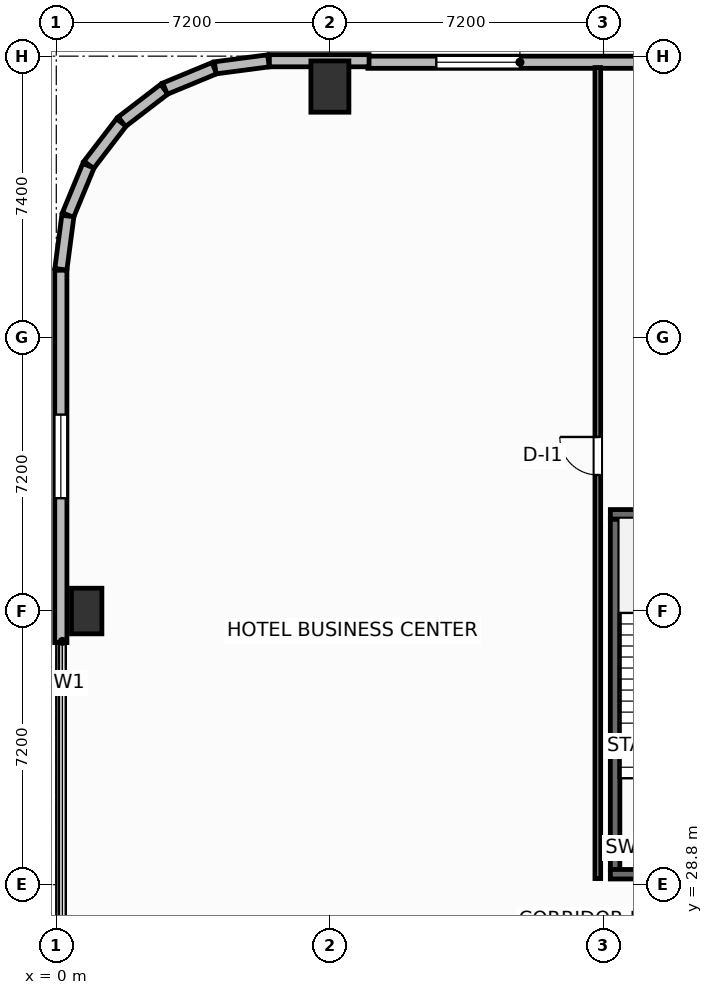
"""IFC4 building model, lengths in metres.
Left out: names, types, materials, properties, quantities, classifications, styles, units other than length and angle.
Written with IfcOpenShell. Run it as: python <this file> out.ifc"""

import sys

from ifc_helpers import new_model, si_unit, direction, frame, frame_2d, origin, origin_2d, place, context, subcontext, project, spatial, rectangle, extrude, element, fill, save


model = new_model("IFC4")
c1 = context("Model", 3, precision=1e-05, world=origin(), true_north=direction((0.0, 1.0)))
c2 = subcontext(c1, "Body", "Model", "MODEL_VIEW")
j1 = project(units=[si_unit("LENGTHUNIT", "METRE"), si_unit("PLANEANGLEUNIT", "RADIAN")], contexts=[c1])
p1 = place(None, origin())
s1 = spatial("IfcSite", under=j1, at=p1, CompositionType="ELEMENT")
p2 = place(p1, origin())
s2 = spatial("IfcBuilding", under=s1, at=p2, CompositionType="ELEMENT")
p3 = place(p2, frame((0.0, 0.0, 16.2)))
s3 = spatial("IfcBuildingStorey", under=s2, at=p3, CompositionType="ELEMENT", Elevation=16.2)
p4 = place(p3, frame((14.705, 29.2, 0.0), z_axis=(0.0, 0.0, 1.0), x_axis=(0.0, 1.0, 0.0)))
e1 = element("IfcWall", 1, at=p4, inside=s3, PredefinedType="SHEAR", context=c2, shape_type="SweptSolid", body=[
    extrude(rectangle(XDim=9.22, YDim=0.25, at=frame_2d((4.61, 0.0))), origin(), (0.0, 0.0, 1.0), 5.08),
])
for number, where, z_axis, x_axis in (
    (2, (14.58, 38.545, 0.0), (0.0, 0.0, 1.0), (1.0, 0.0, 0.0)),
    (3, (14.58, 29.075, 0.0), (0.0, 0.0, 1.0), (1.0, 0.0, 0.0)),
):
    element("IfcWall", number, at=place(p3, frame(where, z_axis=z_axis, x_axis=x_axis)), inside=s3, PredefinedType="SHEAR", context=c2, shape_type="SweptSolid", body=[
        extrude(rectangle(XDim=3.89, YDim=0.25, at=frame_2d((1.945, 0.0))), origin(), (0.0, 0.0, 1.0), 5.08),
    ])
p5 = place(p3, frame((7.2, 49.8, 0.0), z_axis=(0.0, 0.0, 1.0), x_axis=(1.0, 0.0, 0.0)))
e4 = element("IfcColumn", 4, at=p5, inside=s3, PredefinedType="COLUMN", context=c2, shape_type="SweptSolid", body=[
    extrude(rectangle(XDim=1.0, YDim=1.35, at=origin_2d()), origin(), (0.0, 0.0, 1.0), 5.4),
])
p6 = place(p3, frame((0.8, 36.0, 0.0), z_axis=(0.0, 0.0, 1.0), x_axis=(1.0, 0.0, 0.0)))
e5 = element("IfcColumn", 5, at=p6, inside=s3, PredefinedType="PILASTER", context=c2, shape_type="SweptSolid", body=[
    extrude(rectangle(XDim=0.8, YDim=1.2, at=origin_2d()), origin(), (0.0, 0.0, 1.0), 5.4),
])
p7 = place(p3, frame((8.2, 50.44, 0.0), z_axis=(0.0, 0.0, 1.0), x_axis=(1.0, 0.0, 0.0)))
e6 = element("IfcWall", 6, at=p7, inside=s3, PredefinedType="SOLIDWALL", context=c2, shape_type="SweptSolid", body=[
    extrude(rectangle(XDim=15.2, YDim=0.32, at=frame_2d((7.6, 0.0))), origin(), (0.0, 0.0, 1.0), 4.03),
])
p8 = place(p7, frame((1.8, 0.0, 0.8)))
e7 = element("IfcOpeningElement", 7, at=p8, cuts=e6, PredefinedType="OPENING", context=c2, shape_type="SweptSolid", body=[
    extrude(rectangle(XDim=2.2, YDim=1.85, at=frame_2d((1.1, 0.925))), frame((0.0, 0.17, 0.0), z_axis=(0.0, -1.0, 0.0), x_axis=(1.0, 0.0, 0.0)), (0.0, 0.0, 1.0), 0.34),
])
p9 = place(p7, frame((11.2, 0.0, 0.8)))
e8 = element("IfcOpeningElement", 8, at=p9, cuts=e6, PredefinedType="OPENING", context=c2, shape_type="SweptSolid", body=[
    extrude(rectangle(XDim=2.2, YDim=1.85, at=frame_2d((1.1, 0.925))), frame((0.0, 0.17, 0.0), z_axis=(0.0, -1.0, 0.0), x_axis=(1.0, 0.0, 0.0)), (0.0, 0.0, 1.0), 0.34),
])
p10 = place(p3, frame((8.23, 50.48, 0.0), z_axis=(0.0, 0.0, 1.0), x_axis=(-1.0, 0.0, 0.0)))
e9 = element("IfcWall", 9, at=p10, inside=s3, PredefinedType="SOLIDWALL", context=c2, shape_type="SweptSolid", body=[
    extrude(rectangle(XDim=2.622, YDim=0.32, at=frame_2d((1.311, 0.0))), origin(), (0.0, 0.0, 1.0), 4.03),
])
p11 = place(p3, frame((5.583, 50.477, 0.0), z_axis=(0.0, 0.0, 1.0), x_axis=(-0.991434880626, -0.130601981138, 0.0)))
e10 = element("IfcWall", 10, at=p11, inside=s3, PredefinedType="SOLIDWALL", context=c2, shape_type="SweptSolid", body=[
    extrude(rectangle(XDim=1.413, YDim=0.32, at=frame_2d((0.707, 0.0))), origin(), (0.0, 0.0, 1.0), 4.03),
])
p12 = place(p3, frame((4.159, 50.283, 0.0), z_axis=(0.0, 0.0, 1.0), x_axis=(-0.923841042178, -0.382776343035, 0.0)))
e11 = element("IfcWall", 11, at=p12, inside=s3, PredefinedType="SOLIDWALL", context=c2, shape_type="SweptSolid", body=[
    extrude(rectangle(XDim=1.405, YDim=0.32, at=frame_2d((0.703, 0.0))), origin(), (0.0, 0.0, 1.0), 4.03),
])
p13 = place(p3, frame((2.841, 49.73, 0.0), z_axis=(0.0, 0.0, 1.0), x_axis=(-0.79338541907, -0.60871962085, 0.0)))
e12 = element("IfcWall", 12, at=p13, inside=s3, PredefinedType="SOLIDWALL", context=c2, shape_type="SweptSolid", body=[
    extrude(rectangle(XDim=1.405, YDim=0.32, at=frame_2d((0.703, 0.0))), origin(), (0.0, 0.0, 1.0), 4.03),
])
p14 = place(p3, frame((1.711, 48.854, 0.0), z_axis=(0.0, 0.0, 1.0), x_axis=(-0.608828954222, -0.793301521807, 0.0)))
e13 = element("IfcWall", 13, at=p14, inside=s3, PredefinedType="SOLIDWALL", context=c2, shape_type="SweptSolid", body=[
    extrude(rectangle(XDim=1.406, YDim=0.32, at=frame_2d((0.703, 0.0))), origin(), (0.0, 0.0, 1.0), 4.03),
])
p15 = place(p3, frame((0.846, 47.716, 0.0), z_axis=(0.0, 0.0, 1.0), x_axis=(-0.382924622758, -0.923779591291, 0.0)))
e14 = element("IfcWall", 14, at=p15, inside=s3, PredefinedType="SOLIDWALL", context=c2, shape_type="SweptSolid", body=[
    extrude(rectangle(XDim=1.405, YDim=0.32, at=frame_2d((0.703, 0.0))), origin(), (0.0, 0.0, 1.0), 4.03),
])
p16 = place(p3, frame((0.304, 46.393, 0.0), z_axis=(0.0, 0.0, 1.0), x_axis=(-0.130432168094, -0.991457235349, 0.0)))
e15 = element("IfcWall", 15, at=p16, inside=s3, PredefinedType="SOLIDWALL", context=c2, shape_type="SweptSolid", body=[
    extrude(rectangle(XDim=1.413, YDim=0.32, at=frame_2d((0.707, 0.0))), origin(), (0.0, 0.0, 1.0), 4.03),
])
p17 = place(p3, frame((0.12, 44.967, 0.0), z_axis=(0.0, 0.0, 1.0), x_axis=(0.0, -1.0, 0.0)))
e16 = element("IfcWall", 16, at=p17, inside=s3, PredefinedType="SOLIDWALL", context=c2, shape_type="SweptSolid", body=[
    extrude(rectangle(XDim=9.797, YDim=0.32, at=frame_2d((4.898, 0.0))), origin(), (0.0, 0.0, 1.0), 4.03),
])
p18 = place(p17, frame((3.799, 0.0, 0.8)))
e17 = element("IfcOpeningElement", 17, at=p18, cuts=e16, PredefinedType="OPENING", context=c2, shape_type="SweptSolid", body=[
    extrude(rectangle(XDim=2.2, YDim=2.0, at=frame_2d((1.1, 1.0))), frame((0.0, 0.17, 0.0), z_axis=(0.0, -1.0, 0.0), x_axis=(1.0, 0.0, 0.0)), (0.0, 0.0, 1.0), 0.34),
])
p19 = place(p3, frame((14.25, 28.96, 0.0), z_axis=(0.0, 0.0, 1.0), x_axis=(0.0, 1.0, 0.0)))
e18 = element("IfcWall", 18, at=p19, inside=s3, PredefinedType="PARTITIONING", context=c2, shape_type="SweptSolid", body=[
    extrude(rectangle(XDim=21.34, YDim=0.15, at=frame_2d((10.67, 0.0))), origin(), (0.0, 0.0, 1.0), 5.08),
])
p20 = place(p19, frame((10.62, 0.0, 0.0)))
e19 = element("IfcOpeningElement", 19, at=p20, cuts=e18, PredefinedType="OPENING", context=c2, shape_type="SweptSolid", body=[
    extrude(rectangle(XDim=1.0, YDim=2.05, at=frame_2d((0.5, 1.025))), frame((0.0, 0.085, 0.0), z_axis=(0.0, -1.0, 0.0), x_axis=(1.0, 0.0, 0.0)), (0.0, 0.0, 1.0), 0.17),
])
p21 = place(p8, origin())
e20 = element("IfcWindow", 20, at=p21, inside=s3, PartitioningType="SINGLE_PANEL", PredefinedType="WINDOW", context=c2, shape_type="SweptSolid", body=[
    extrude(rectangle(XDim=2.2, YDim=1.85, at=frame_2d((1.1, 0.925))), frame((0.0, 0.03, 0.0), z_axis=(0.0, -1.0, 0.0), x_axis=(1.0, 0.0, 0.0)), (0.0, 0.0, 1.0), 0.06),
])
fill(e7, e20)
p22 = place(p18, origin())
e21 = element("IfcWindow", 21, at=p22, inside=s3, PartitioningType="SINGLE_PANEL", PredefinedType="WINDOW", context=c2, shape_type="SweptSolid", body=[
    extrude(rectangle(XDim=2.2, YDim=2.0, at=frame_2d((1.1, 1.0))), frame((0.0, 0.03, 0.0), z_axis=(0.0, -1.0, 0.0), x_axis=(1.0, 0.0, 0.0)), (0.0, 0.0, 1.0), 0.06),
])
fill(e17, e21)
p23 = place(p20, origin())
e22 = element("IfcDoor", 22, at=p23, inside=s3, OperationType="SINGLE_SWING_RIGHT", PredefinedType="DOOR", context=c2, shape_type="SweptSolid", body=[
    extrude(rectangle(XDim=1.0, YDim=2.05, at=frame_2d((0.5, 1.025))), frame((0.0, 0.025, 0.0), z_axis=(0.0, -1.0, 0.0), x_axis=(1.0, 0.0, 0.0)), (0.0, 0.0, 1.0), 0.05),
])
fill(e19, e22)
save(model, sys.argv[1])
